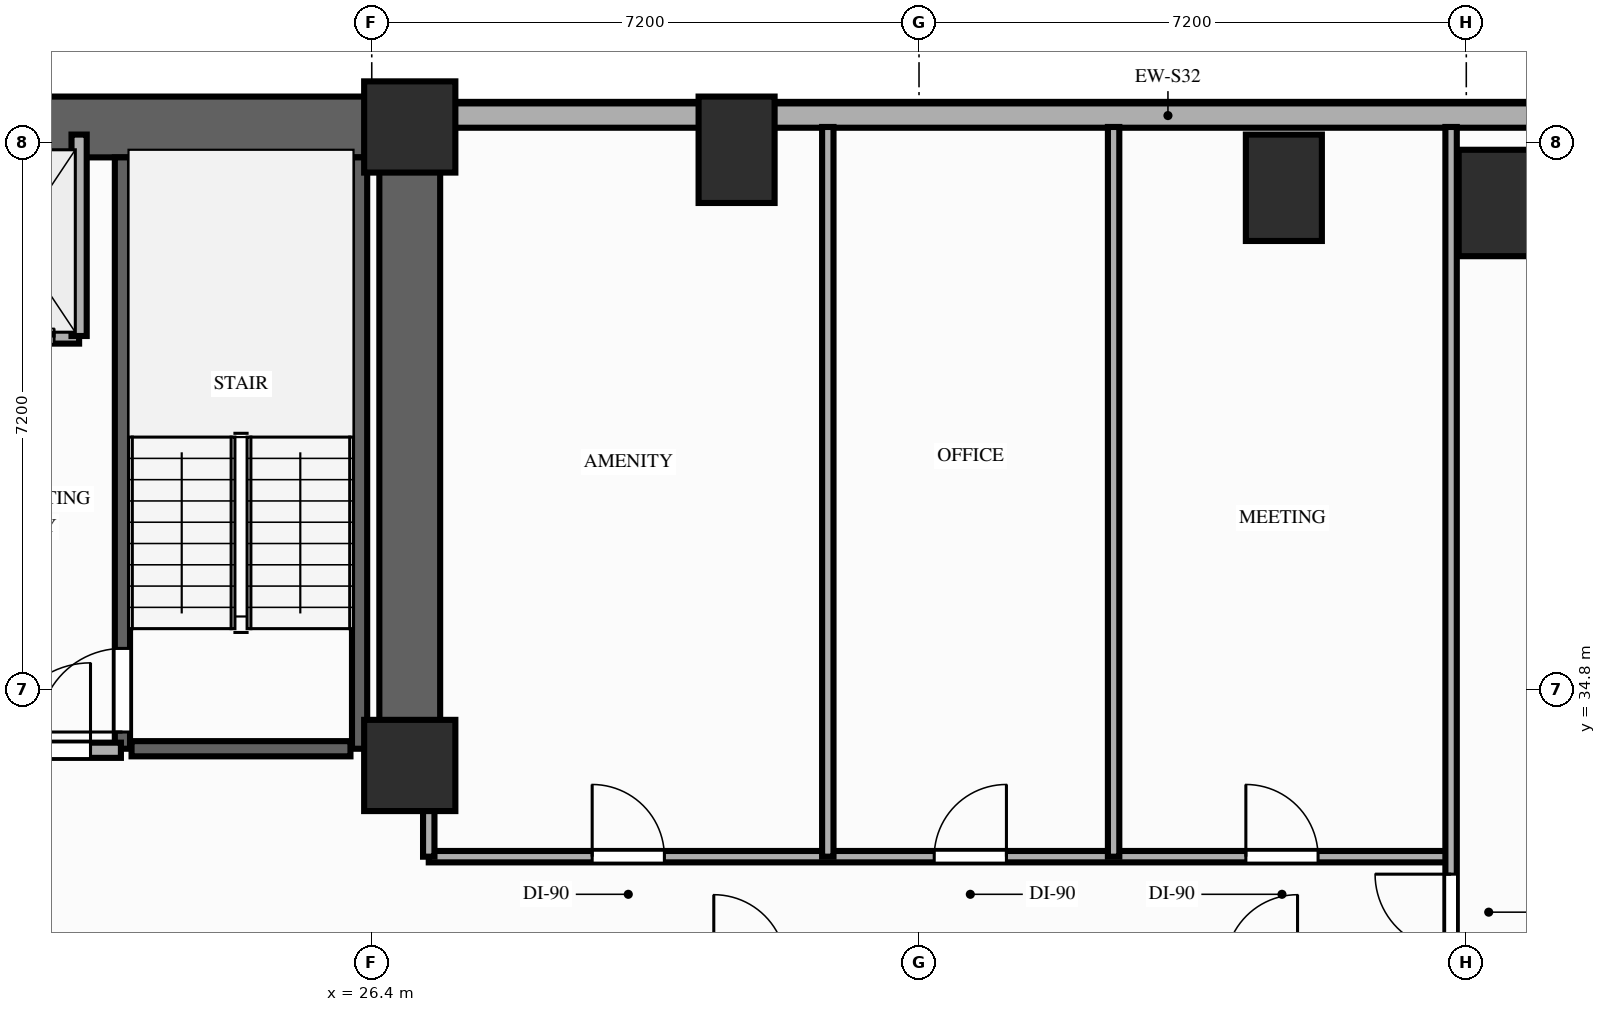
"""IFC4 building model, lengths in metres.
Left out: names, types, materials, properties, quantities, classifications, styles, units other than length and angle.
Written with IfcOpenShell. Run it as: python <this file> out.ifc"""

import sys

from ifc_helpers import new_model, si_unit, direction, frame, frame_2d, origin, origin_2d, place, context, subcontext, project, spatial, rectangle, extrude, element, fill, save


model = new_model("IFC4")
c1 = context("Model", 3, precision=1e-05, world=origin(), true_north=direction((0.0, 1.0)))
c2 = subcontext(c1, "Body", "Model", "MODEL_VIEW")
j1 = project(units=[si_unit("LENGTHUNIT", "METRE"), si_unit("PLANEANGLEUNIT", "RADIAN")], contexts=[c1])
p1 = place(None, origin())
s1 = spatial("IfcSite", under=j1, at=p1, CompositionType="ELEMENT")
p2 = place(p1, origin())
s2 = spatial("IfcBuilding", under=s1, at=p2, CompositionType="ELEMENT")
p3 = place(p2, frame((0.0, 0.0, 62.8)))
s3 = spatial("IfcBuildingStorey", under=s2, at=p3, CompositionType="ELEMENT", Elevation=62.8)
for number, where, z_axis, x_axis in (
    (1, (26.9, 33.8, 0.0), (0.0, 0.0, 1.0), (1.0, 0.0, 0.0)),
    (2, (26.9, 42.2, 0.0), (0.0, 0.0, 1.0), (1.0, 0.0, 0.0)),
):
    element("IfcColumn", number, at=place(p3, frame(where, z_axis=z_axis, x_axis=x_axis)), inside=s3, PredefinedType="COLUMN", context=c2, shape_type="SweptSolid", body=[
        extrude(rectangle(XDim=1.2, YDim=1.2, at=origin_2d()), origin(), (0.0, 0.0, 1.0), 3.2),
    ])
for number, where, z_axis, x_axis in (
    (3, (31.2, 41.9, 0.0), (0.0, 0.0, 1.0), (1.0, 0.0, 0.0)),
    (4, (38.4, 41.4, 0.0), (0.0, 0.0, 1.0), (1.0, 0.0, 0.0)),
    (5, (41.2, 41.2, 0.0), (0.0, 0.0, 1.0), (1.0, 0.0, 0.0)),
):
    element("IfcColumn", number, at=place(p3, frame(where, z_axis=z_axis, x_axis=x_axis)), inside=s3, PredefinedType="COLUMN", context=c2, shape_type="SweptSolid", body=[
        extrude(rectangle(XDim=1.0, YDim=1.4, at=origin_2d()), origin(), (0.0, 0.0, 1.0), 3.2),
    ])
p4 = place(p3, frame((46.4, 42.35, 0.0), z_axis=(0.0, 0.0, 1.0), x_axis=(-1.0, 0.0, 0.0)))
e6 = element("IfcWall", 6, at=p4, inside=s3, PredefinedType="STANDARD", context=c2, shape_type="SweptSolid", body=[
    extrude(rectangle(XDim=19.05, YDim=0.32, at=frame_2d((9.525, 0.0))), origin(), (0.0, 0.0, 1.0), 2.4),
])
p5 = place(p3, frame((6.45, 42.2, 0.0), z_axis=(0.0, 0.0, 1.0), x_axis=(1.0, 0.0, 0.0)))
e7 = element("IfcWall", 7, at=p5, inside=s3, PredefinedType="SHEAR", context=c2, shape_type="SweptSolid", body=[
    extrude(rectangle(XDim=20.45, YDim=0.8, at=frame_2d((10.225, 0.0))), origin(), (0.0, 0.0, 1.0), 3.02),
])
p6 = place(p3, frame((26.9, 33.8, 0.0), z_axis=(0.0, 0.0, 1.0), x_axis=(0.0, 1.0, 0.0)))
e8 = element("IfcWall", 8, at=p6, inside=s3, PredefinedType="SHEAR", context=c2, shape_type="SweptSolid", body=[
    extrude(rectangle(XDim=7.95, YDim=0.8, at=frame_2d((3.975, 0.0))), origin(), (0.0, 0.0, 1.0), 3.02),
])
p7 = place(p3, frame((23.12, 34.02, 0.0), z_axis=(0.0, 0.0, 1.0), x_axis=(0.0, 1.0, 0.0)))
e9 = element("IfcWall", 9, at=p7, inside=s3, PredefinedType="SHEAR", context=c2, shape_type="SweptSolid", body=[
    extrude(rectangle(XDim=7.78, YDim=0.2, at=frame_2d((3.89, 0.0))), origin(), (0.0, 0.0, 1.0), 3.02),
])
p8 = place(p7, frame((0.22, 0.0, 0.0)))
e10 = element("IfcOpeningElement", 10, at=p8, cuts=e9, PredefinedType="OPENING", context=c2, shape_type="SweptSolid", body=[
    extrude(rectangle(XDim=1.1, YDim=2.15, at=frame_2d((0.55, 1.075))), frame((0.0, 0.11, 0.0), z_axis=(0.0, -1.0, 0.0), x_axis=(1.0, 0.0, 0.0)), (0.0, 0.0, 1.0), 0.22),
])
p9 = place(p3, frame((26.24, 34.02, 0.0), z_axis=(0.0, 0.0, 1.0), x_axis=(0.0, 1.0, 0.0)))
e11 = element("IfcWall", 11, at=p9, inside=s3, PredefinedType="SHEAR", context=c2, shape_type="SweptSolid", body=[
    extrude(rectangle(XDim=7.78, YDim=0.2, at=frame_2d((3.89, 0.0))), origin(), (0.0, 0.0, 1.0), 3.02),
])
p10 = place(p3, frame((23.24, 34.02, 0.0), z_axis=(0.0, 0.0, 1.0), x_axis=(1.0, 0.0, 0.0)))
e12 = element("IfcWall", 12, at=p10, inside=s3, PredefinedType="SHEAR", context=c2, shape_type="SweptSolid", body=[
    extrude(rectangle(XDim=2.88, YDim=0.2, at=frame_2d((1.44, 0.0))), origin(), (0.0, 0.0, 1.0), 3.02),
])
p11 = place(p3, frame((20.85, 39.45, 0.0), z_axis=(0.0, 0.0, 1.0), x_axis=(1.0, 0.0, 0.0)))
e13 = element("IfcWall", 13, at=p11, inside=s3, PredefinedType="MOVABLE", context=c2, shape_type="SweptSolid", body=[
    extrude(rectangle(XDim=1.7, YDim=0.2, at=frame_2d((0.85, 0.0))), origin(), (0.0, 0.0, 1.0), 3.02),
])
p12 = place(p11, frame((0.32, 0.0, 0.0)))
e14 = element("IfcOpeningElement", 14, at=p12, cuts=e13, PredefinedType="OPENING", context=c2, shape_type="SweptSolid", body=[
    extrude(rectangle(XDim=1.05, YDim=2.15, at=frame_2d((0.525, 1.075))), frame((0.0, 0.11, 0.0), z_axis=(0.0, -1.0, 0.0), x_axis=(1.0, 0.0, 0.0)), (0.0, 0.0, 1.0), 0.22),
])
p13 = place(p3, frame((22.55, 39.45, 0.0), z_axis=(0.0, 0.0, 1.0), x_axis=(0.0, 1.0, 0.0)))
e15 = element("IfcWall", 15, at=p13, inside=s3, PredefinedType="MOVABLE", context=c2, shape_type="SweptSolid", body=[
    extrude(rectangle(XDim=2.65, YDim=0.2, at=frame_2d((1.325, 0.0))), origin(), (0.0, 0.0, 1.0), 2.4),
])
p14 = place(p3, frame((20.5, 34.0, 0.0), z_axis=(0.0, 0.0, 1.0), x_axis=(1.0, 0.0, 0.0)))
e16 = element("IfcWall", 16, at=p14, inside=s3, PredefinedType="PARTITIONING", context=c2, shape_type="SweptSolid", body=[
    extrude(rectangle(XDim=2.6, YDim=0.2, at=frame_2d((1.3, 0.0))), origin(), (0.0, 0.0, 1.0), 2.4),
])
p15 = place(p14, frame((1.05, 0.0, 0.0)))
e17 = element("IfcOpeningElement", 17, at=p15, cuts=e16, PredefinedType="OPENING", context=c2, shape_type="SweptSolid", body=[
    extrude(rectangle(XDim=1.15, YDim=2.15, at=frame_2d((0.575, 1.075))), frame((0.0, 0.11, 0.0), z_axis=(0.0, -1.0, 0.0), x_axis=(1.0, 0.0, 0.0)), (0.0, 0.0, 1.0), 0.22),
])
p16 = place(p3, frame((27.15, 32.6, 0.0), z_axis=(0.0, 0.0, 1.0), x_axis=(1.0, 0.0, 0.0)))
e18 = element("IfcWall", 18, at=p16, inside=s3, PredefinedType="PARTITIONING", context=c2, shape_type="SweptSolid", body=[
    extrude(rectangle(XDim=13.45, YDim=0.15, at=frame_2d((6.725, 0.0))), origin(), (0.0, 0.0, 1.0), 2.4),
])
p17 = place(p16, frame((2.15, 0.0, 0.0)))
e19 = element("IfcOpeningElement", 19, at=p17, cuts=e18, PredefinedType="OPENING", context=c2, shape_type="SweptSolid", body=[
    extrude(rectangle(XDim=0.95, YDim=2.15, at=frame_2d((0.475, 1.075))), frame((0.0, 0.085, 0.0), z_axis=(0.0, -1.0, 0.0), x_axis=(1.0, 0.0, 0.0)), (0.0, 0.0, 1.0), 0.17),
])
p18 = place(p16, frame((6.65, 0.0, 0.0)))
e20 = element("IfcOpeningElement", 20, at=p18, cuts=e18, PredefinedType="OPENING", context=c2, shape_type="SweptSolid", body=[
    extrude(rectangle(XDim=0.95, YDim=2.15, at=frame_2d((0.475, 1.075))), frame((0.0, 0.085, 0.0), z_axis=(0.0, -1.0, 0.0), x_axis=(1.0, 0.0, 0.0)), (0.0, 0.0, 1.0), 0.17),
])
p19 = place(p16, frame((10.75, 0.0, 0.0)))
e21 = element("IfcOpeningElement", 21, at=p19, cuts=e18, PredefinedType="OPENING", context=c2, shape_type="SweptSolid", body=[
    extrude(rectangle(XDim=0.95, YDim=2.15, at=frame_2d((0.475, 1.075))), frame((0.0, 0.085, 0.0), z_axis=(0.0, -1.0, 0.0), x_axis=(1.0, 0.0, 0.0)), (0.0, 0.0, 1.0), 0.17),
])
p20 = place(p3, frame((27.15, 32.6, 0.0), z_axis=(0.0, 0.0, 1.0), x_axis=(0.0, 1.0, 0.0)))
e22 = element("IfcWall", 22, at=p20, inside=s3, PredefinedType="PARTITIONING", context=c2, shape_type="SweptSolid", body=[
    extrude(rectangle(XDim=1.08, YDim=0.15, at=frame_2d((0.54, 0.0))), origin(), (0.0, 0.0, 1.0), 2.4),
])
p21 = place(p3, frame((40.6, 26.75, 0.0), z_axis=(0.0, 0.0, 1.0), x_axis=(0.0, 1.0, 0.0)))
e23 = element("IfcWall", 23, at=p21, inside=s3, PredefinedType="PARTITIONING", context=c2, shape_type="SweptSolid", body=[
    extrude(rectangle(XDim=15.45, YDim=0.15, at=frame_2d((7.725, 0.0))), origin(), (0.0, 0.0, 1.0), 2.4),
])
p22 = place(p21, frame((4.62, 0.0, 0.0)))
e24 = element("IfcOpeningElement", 24, at=p22, cuts=e23, PredefinedType="OPENING", context=c2, shape_type="SweptSolid", body=[
    extrude(rectangle(XDim=1.0, YDim=2.15, at=frame_2d((0.5, 1.075))), frame((0.0, 0.085, 0.0), z_axis=(0.0, -1.0, 0.0), x_axis=(1.0, 0.0, 0.0)), (0.0, 0.0, 1.0), 0.17),
])
for number, where, z_axis, x_axis in (
    (25, (32.4, 32.6, 0.0), (0.0, 0.0, 1.0), (0.0, 1.0, 0.0)),
    (26, (36.16, 32.6, 0.0), (0.0, 0.0, 1.0), (0.0, 1.0, 0.0)),
):
    element("IfcWall", number, at=place(p3, frame(where, z_axis=z_axis, x_axis=x_axis)), inside=s3, PredefinedType="PARTITIONING", context=c2, shape_type="SweptSolid", body=[
        extrude(rectangle(XDim=9.6, YDim=0.15, at=frame_2d((4.8, 0.0))), origin(), (0.0, 0.0, 1.0), 2.4),
    ])
p23 = place(p8, origin())
e27 = element("IfcDoor", 27, at=p23, inside=s3, OperationType="SINGLE_SWING_LEFT", PredefinedType="DOOR", context=c2, shape_type="SweptSolid", body=[
    extrude(rectangle(XDim=1.1, YDim=2.15, at=frame_2d((0.55, 1.075))), frame((0.0, 0.025, 0.0), z_axis=(0.0, -1.0, 0.0), x_axis=(1.0, 0.0, 0.0)), (0.0, 0.0, 1.0), 0.05),
])
fill(e10, e27)
p24 = place(p12, origin())
e28 = element("IfcDoor", 28, at=p24, inside=s3, OperationType="SLIDING_TO_LEFT", PredefinedType="DOOR", context=c2, shape_type="SweptSolid", body=[
    extrude(rectangle(XDim=1.05, YDim=2.15, at=frame_2d((0.525, 1.075))), frame((0.0, 0.025, 0.0), z_axis=(0.0, -1.0, 0.0), x_axis=(1.0, 0.0, 0.0)), (0.0, 0.0, 1.0), 0.05),
])
fill(e14, e28)
p25 = place(p15, origin())
e29 = element("IfcDoor", 29, at=p25, inside=s3, OperationType="SINGLE_SWING_RIGHT", PredefinedType="DOOR", context=c2, shape_type="SweptSolid", body=[
    extrude(rectangle(XDim=1.15, YDim=2.15, at=frame_2d((0.575, 1.075))), frame((0.0, 0.025, 0.0), z_axis=(0.0, -1.0, 0.0), x_axis=(1.0, 0.0, 0.0)), (0.0, 0.0, 1.0), 0.05),
])
fill(e17, e29)
p26 = place(p22, origin())
e30 = element("IfcDoor", 30, at=p26, inside=s3, OperationType="SINGLE_SWING_RIGHT", PredefinedType="DOOR", context=c2, shape_type="SweptSolid", body=[
    extrude(rectangle(XDim=1.0, YDim=2.15, at=frame_2d((0.5, 1.075))), frame((0.0, 0.025, 0.0), z_axis=(0.0, -1.0, 0.0), x_axis=(1.0, 0.0, 0.0)), (0.0, 0.0, 1.0), 0.05),
])
fill(e24, e30)
p27 = place(p17, origin())
e31 = element("IfcDoor", 31, at=p27, inside=s3, OperationType="SINGLE_SWING_LEFT", PredefinedType="DOOR", context=c2, shape_type="SweptSolid", body=[
    extrude(rectangle(XDim=0.95, YDim=2.15, at=frame_2d((0.475, 1.075))), frame((0.0, 0.025, 0.0), z_axis=(0.0, -1.0, 0.0), x_axis=(1.0, 0.0, 0.0)), (0.0, 0.0, 1.0), 0.05),
])
fill(e19, e31)
p28 = place(p18, origin())
e32 = element("IfcDoor", 32, at=p28, inside=s3, OperationType="SINGLE_SWING_RIGHT", PredefinedType="DOOR", context=c2, shape_type="SweptSolid", body=[
    extrude(rectangle(XDim=0.95, YDim=2.15, at=frame_2d((0.475, 1.075))), frame((0.0, 0.025, 0.0), z_axis=(0.0, -1.0, 0.0), x_axis=(1.0, 0.0, 0.0)), (0.0, 0.0, 1.0), 0.05),
])
fill(e20, e32)
p29 = place(p19, origin())
e33 = element("IfcDoor", 33, at=p29, inside=s3, OperationType="SINGLE_SWING_LEFT", PredefinedType="DOOR", context=c2, shape_type="SweptSolid", body=[
    extrude(rectangle(XDim=0.95, YDim=2.15, at=frame_2d((0.475, 1.075))), frame((0.0, 0.025, 0.0), z_axis=(0.0, -1.0, 0.0), x_axis=(1.0, 0.0, 0.0)), (0.0, 0.0, 1.0), 0.05),
])
fill(e21, e33)
save(model, sys.argv[1])
